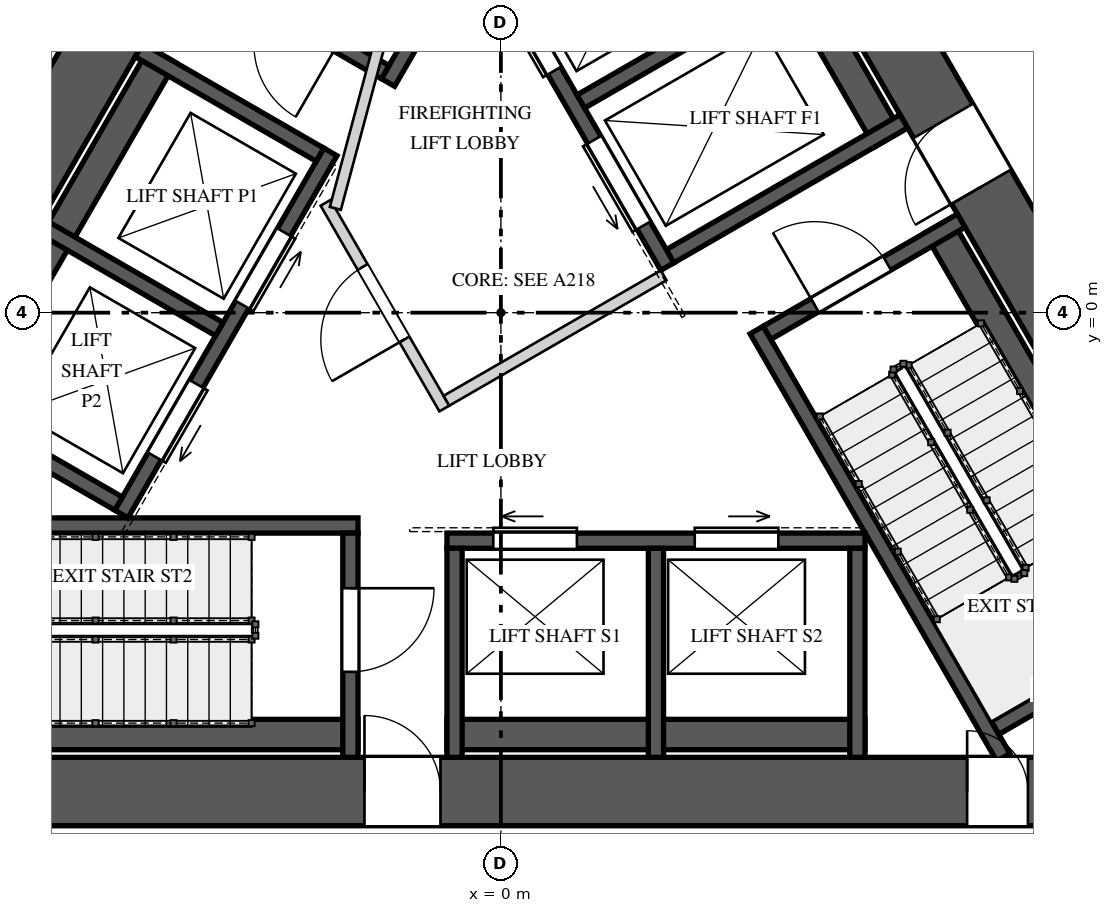
"""IFC4 building model, lengths in metres.
Left out: names, types, materials, properties, quantities, classifications, styles, units other than length and angle.
Written with IfcOpenShell. Run it as: python <this file> out.ifc"""

import sys

from ifc_helpers import new_model, si_unit, direction, frame, frame_2d, origin, place, context, subcontext, project, spatial, rectangle, extrude, element, fill, save


model = new_model("IFC4")
c1 = context("Model", 3, precision=1e-05, world=origin(), true_north=direction((0.0, 1.0)))
c2 = subcontext(c1, "Body", "Model", "MODEL_VIEW")
j1 = project(units=[si_unit("LENGTHUNIT", "METRE"), si_unit("PLANEANGLEUNIT", "RADIAN")], contexts=[c1])
p1 = place(None, origin())
s1 = spatial("IfcSite", under=j1, at=p1, CompositionType="ELEMENT")
p2 = place(p1, origin())
s2 = spatial("IfcBuilding", under=s1, at=p2, CompositionType="ELEMENT")
p3 = place(p2, frame((0.0, 0.0, 125.6)))
s3 = spatial("IfcBuildingStorey", under=s2, at=p3, CompositionType="ELEMENT", Elevation=125.6)
p4 = place(p3, frame((-1.184, 10.55, 0.0), z_axis=(0.0, 0.0, 1.0), x_axis=(-0.500004814304, -0.866022624227, 0.0)))
e1 = element("IfcWall", 1, at=p4, inside=s3, PredefinedType="SHEAR", context=c2, shape_type="SweptSolid", body=[
    extrude(rectangle(XDim=17.09, YDim=0.9, at=frame_2d((8.545, 0.0))), origin(), (0.0, 0.0, 1.0), 4.0),
])
p5 = place(p4, frame((6.75, 0.0, 0.0)))
e2 = element("IfcOpeningElement", 2, at=p5, cuts=e1, PredefinedType="OPENING", context=c2, shape_type="SweptSolid", body=[
    extrude(rectangle(XDim=1.0, YDim=2.4, at=frame_2d((0.5, 1.2))), frame((0.0, 0.46, 0.0), z_axis=(0.0, -1.0, 0.0), x_axis=(1.0, 0.0, 0.0)), (0.0, 0.0, 1.0), 0.92),
])
p6 = place(p4, frame((14.678, 0.0, 0.0)))
e3 = element("IfcOpeningElement", 3, at=p6, cuts=e1, PredefinedType="OPENING", context=c2, shape_type="SweptSolid", body=[
    extrude(rectangle(XDim=0.8, YDim=2.1, at=frame_2d((0.4, 1.05))), frame((0.0, 0.46, 0.0), z_axis=(0.0, -1.0, 0.0), x_axis=(1.0, 0.0, 0.0)), (0.0, 0.0, 1.0), 0.92),
])
p7 = place(p3, frame((-8.545, -6.3, 0.0), z_axis=(0.0, 0.0, 1.0), x_axis=(1.0, 0.0, 0.0)))
e4 = element("IfcWall", 4, at=p7, inside=s3, PredefinedType="SHEAR", context=c2, shape_type="SweptSolid", body=[
    extrude(rectangle(XDim=17.09, YDim=0.9, at=frame_2d((8.545, 0.0))), origin(), (0.0, 0.0, 1.0), 4.0),
])
p8 = place(p7, frame((6.75, 0.0, 0.0)))
e5 = element("IfcOpeningElement", 5, at=p8, cuts=e4, PredefinedType="OPENING", context=c2, shape_type="SweptSolid", body=[
    extrude(rectangle(XDim=1.0, YDim=2.4, at=frame_2d((0.5, 1.2))), frame((0.0, 0.46, 0.0), z_axis=(0.0, -1.0, 0.0), x_axis=(1.0, 0.0, 0.0)), (0.0, 0.0, 1.0), 0.92),
])
p9 = place(p7, frame((14.678, 0.0, 0.0)))
e6 = element("IfcOpeningElement", 6, at=p9, cuts=e4, PredefinedType="OPENING", context=c2, shape_type="SweptSolid", body=[
    extrude(rectangle(XDim=0.8, YDim=2.1, at=frame_2d((0.4, 1.05))), frame((0.0, 0.46, 0.0), z_axis=(0.0, -1.0, 0.0), x_axis=(1.0, 0.0, 0.0)), (0.0, 0.0, 1.0), 0.92),
])
p10 = place(p3, frame((9.729, -4.25, 0.0), z_axis=(0.0, 0.0, 1.0), x_axis=(-0.500004814304, 0.866022624227, 0.0)))
e7 = element("IfcWall", 7, at=p10, inside=s3, PredefinedType="SHEAR", context=c2, shape_type="SweptSolid", body=[
    extrude(rectangle(XDim=17.09, YDim=0.9, at=frame_2d((8.545, 0.0))), origin(), (0.0, 0.0, 1.0), 4.0),
])
p11 = place(p10, frame((6.82, 0.0, 0.0)))
e8 = element("IfcOpeningElement", 8, at=p11, cuts=e7, PredefinedType="OPENING", context=c2, shape_type="SweptSolid", body=[
    extrude(rectangle(XDim=1.0, YDim=2.4, at=frame_2d((0.5, 1.2))), frame((0.0, 0.46, 0.0), z_axis=(0.0, -1.0, 0.0), x_axis=(1.0, 0.0, 0.0)), (0.0, 0.0, 1.0), 0.92),
])
p12 = place(p3, frame((1.761, 8.65, 0.0), z_axis=(0.0, 0.0, 1.0), x_axis=(-0.500010023241, -0.866019616786, 0.0)))
e9 = element("IfcWall", 9, at=p12, inside=s3, PredefinedType="SOLIDWALL", context=c2, shape_type="SweptSolid", body=[
    extrude(rectangle(XDim=6.491, YDim=0.2, at=frame_2d((3.246, 0.0))), origin(), (0.0, 0.0, 1.0), 3.65),
])
p13 = place(p3, frame((-1.521, 3.165, 0.0), z_axis=(0.0, 0.0, 1.0), x_axis=(-0.866039495442, 0.49997559174, 0.0)))
e10 = element("IfcWall", 10, at=p13, inside=s3, PredefinedType="SOLIDWALL", context=c2, shape_type="SweptSolid", body=[
    extrude(rectangle(XDim=2.95, YDim=0.2, at=frame_2d((1.475, 0.0))), origin(), (0.0, 0.0, 1.0), 3.65),
])
p14 = place(p13, frame((0.725, 0.0, 0.0)))
e11 = element("IfcOpeningElement", 11, at=p14, cuts=e10, PredefinedType="OPENING", context=c2, shape_type="SweptSolid", body=[
    extrude(rectangle(XDim=1.1, YDim=2.4, at=frame_2d((0.55, 1.2))), frame((0.0, 0.11, 0.0), z_axis=(0.0, -1.0, 0.0), x_axis=(1.0, 0.0, 0.0)), (0.0, 0.0, 1.0), 0.22),
])
p15 = place(p3, frame((-8.08, -5.55, 0.0), z_axis=(0.0, 0.0, 1.0), x_axis=(1.0, 0.0, 0.0)))
e12 = element("IfcWall", 12, at=p15, inside=s3, PredefinedType="SOLIDWALL", context=c2, shape_type="SweptSolid", body=[
    extrude(rectangle(XDim=6.2, YDim=0.4, at=frame_2d((3.1, 0.0))), origin(), (0.0, 0.0, 1.0), 3.65),
])
p16 = place(p3, frame((-8.372, -2.8, 0.0), z_axis=(0.0, 0.0, 1.0), x_axis=(1.0, 0.0, 0.0)))
e13 = element("IfcWall", 13, at=p16, inside=s3, PredefinedType="SOLIDWALL", context=c2, shape_type="SweptSolid", body=[
    extrude(rectangle(XDim=6.492, YDim=0.2, at=frame_2d((3.246, 0.0))), origin(), (0.0, 0.0, 1.0), 3.65),
])
p17 = place(p3, frame((-1.98, -2.9, 0.0), z_axis=(0.0, 0.0, 1.0), x_axis=(0.0, -1.0, 0.0)))
e14 = element("IfcWall", 14, at=p17, inside=s3, PredefinedType="SOLIDWALL", context=c2, shape_type="SweptSolid", body=[
    extrude(rectangle(XDim=2.95, YDim=0.2, at=frame_2d((1.475, 0.0))), origin(), (0.0, 0.0, 1.0), 3.65),
])
p18 = place(p17, frame((0.725, 0.0, 0.0)))
e15 = element("IfcOpeningElement", 15, at=p18, cuts=e14, PredefinedType="OPENING", context=c2, shape_type="SweptSolid", body=[
    extrude(rectangle(XDim=1.1, YDim=2.4, at=frame_2d((0.55, 1.2))), frame((0.0, 0.11, 0.0), z_axis=(0.0, -1.0, 0.0), x_axis=(1.0, 0.0, 0.0)), (0.0, 0.0, 1.0), 0.22),
])
p19 = place(p3, frame((8.846, -4.222, 0.0), z_axis=(0.0, 0.0, 1.0), x_axis=(-0.500009909098, 0.866019682689, 0.0)))
e16 = element("IfcWall", 16, at=p19, inside=s3, PredefinedType="SOLIDWALL", context=c2, shape_type="SweptSolid", body=[
    extrude(rectangle(XDim=6.2, YDim=0.4, at=frame_2d((3.1, 0.0))), origin(), (0.0, 0.0, 1.0), 3.65),
])
p20 = place(p3, frame((6.611, -5.85, 0.0), z_axis=(0.0, 0.0, 1.0), x_axis=(-0.499965531574, 0.866045303225, 0.0)))
e17 = element("IfcWall", 17, at=p20, inside=s3, PredefinedType="SOLIDWALL", context=c2, shape_type="SweptSolid", body=[
    extrude(rectangle(XDim=6.492, YDim=0.2, at=frame_2d((3.246, 0.0))), origin(), (0.0, 0.0, 1.0), 3.65),
])
p21 = place(p3, frame((6.501, -5.461, 0.0), z_axis=(0.0, 0.0, 1.0), x_axis=(0.866003658127, 0.500037662692, 0.0)))
e18 = element("IfcWall", 18, at=p21, inside=s3, PredefinedType="SOLIDWALL", context=c2, shape_type="SweptSolid", body=[
    extrude(rectangle(XDim=2.95, YDim=0.2, at=frame_2d((1.475, 0.0))), origin(), (0.0, 0.0, 1.0), 3.65),
])
p22 = place(p3, frame((3.501, -0.265, 0.0), z_axis=(0.0, 0.0, 1.0), x_axis=(0.866039495442, 0.49997559174, 0.0)))
e19 = element("IfcWall", 19, at=p22, inside=s3, PredefinedType="SOLIDWALL", context=c2, shape_type="SweptSolid", body=[
    extrude(rectangle(XDim=2.95, YDim=0.2, at=frame_2d((1.475, 0.0))), origin(), (0.0, 0.0, 1.0), 3.65),
])
p23 = place(p22, frame((0.725, 0.0, 0.0)))
e20 = element("IfcOpeningElement", 20, at=p23, cuts=e19, PredefinedType="OPENING", context=c2, shape_type="SweptSolid", body=[
    extrude(rectangle(XDim=1.1, YDim=2.4, at=frame_2d((0.55, 1.2))), frame((0.0, 0.11, 0.0), z_axis=(0.0, -1.0, 0.0), x_axis=(1.0, 0.0, 0.0)), (0.0, 0.0, 1.0), 0.22),
])
p24 = place(p3, frame((-2.243, 2.115, 0.0), z_axis=(0.0, 0.0, 1.0), x_axis=(-0.499996545922, -0.866027397988, 0.0)))
e21 = element("IfcWall", 21, at=p24, inside=s3, PredefinedType="SOLIDWALL", context=c2, shape_type="SweptSolid", body=[
    extrude(rectangle(XDim=5.5, YDim=0.2, at=frame_2d((2.75, 0.0))), origin(), (0.0, 0.0, 1.0), 3.65),
])
p25 = place(p24, frame((1.22, 0.0, 0.0)))
e22 = element("IfcOpeningElement", 22, at=p25, cuts=e21, PredefinedType="OPENING", context=c2, shape_type="SweptSolid", body=[
    extrude(rectangle(XDim=1.1, YDim=2.1, at=frame_2d((0.55, 1.05))), frame((0.0, 0.11, 0.0), z_axis=(0.0, -1.0, 0.0), x_axis=(1.0, 0.0, 0.0)), (0.0, 0.0, 1.0), 0.22),
])
p26 = place(p24, frame((3.525, 0.0, 0.0)))
e23 = element("IfcOpeningElement", 23, at=p26, cuts=e21, PredefinedType="OPENING", context=c2, shape_type="SweptSolid", body=[
    extrude(rectangle(XDim=1.1, YDim=2.1, at=frame_2d((0.55, 1.05))), frame((0.0, 0.11, 0.0), z_axis=(0.0, -1.0, 0.0), x_axis=(1.0, 0.0, 0.0)), (0.0, 0.0, 1.0), 0.22),
])
p27 = place(p3, frame((-4.451, 3.39, 0.0), z_axis=(0.0, 0.0, 1.0), x_axis=(-0.499996545922, -0.866027397988, 0.0)))
e24 = element("IfcWall", 24, at=p27, inside=s3, PredefinedType="SOLIDWALL", context=c2, shape_type="SweptSolid", body=[
    extrude(rectangle(XDim=5.5, YDim=0.4, at=frame_2d((2.75, 0.0))), origin(), (0.0, 0.0, 1.0), 3.65),
])
for number, where, z_axis, x_axis in (
    (25, (-2.38, 2.078, 0.0), (0.0, 0.0, 1.0), (-0.866, 0.5, 0.0)),
    (26, (-3.705, -0.217, 0.0), (0.0, 0.0, 1.0), (-0.866, 0.5, 0.0)),
):
    element("IfcWall", number, at=place(p3, frame(where, z_axis=z_axis, x_axis=x_axis)), inside=s3, PredefinedType="SOLIDWALL", context=c2, shape_type="SweptSolid", body=[
        extrude(rectangle(XDim=2.75, YDim=0.2, at=frame_2d((1.375, 0.0))), origin(), (0.0, 0.0, 1.0), 3.65),
    ])
p28 = place(p3, frame((-5.03, -2.512, 0.0), z_axis=(0.0, 0.0, 1.0), x_axis=(-0.866005201286, 0.500034990121, 0.0)))
e27 = element("IfcWall", 27, at=p28, inside=s3, PredefinedType="SOLIDWALL", context=c2, shape_type="SweptSolid", body=[
    extrude(rectangle(XDim=2.75, YDim=0.2, at=frame_2d((1.375, 0.0))), origin(), (0.0, 0.0, 1.0), 3.65),
])
p29 = place(p3, frame((-0.71, -3.0, 0.0), z_axis=(0.0, 0.0, 1.0), x_axis=(1.0, 0.0, 0.0)))
e28 = element("IfcWall", 28, at=p29, inside=s3, PredefinedType="SOLIDWALL", context=c2, shape_type="SweptSolid", body=[
    extrude(rectangle(XDim=5.5, YDim=0.2, at=frame_2d((2.75, 0.0))), origin(), (0.0, 0.0, 1.0), 3.65),
])
p30 = place(p29, frame((0.61, 0.0, 0.0)))
e29 = element("IfcOpeningElement", 29, at=p30, cuts=e28, PredefinedType="OPENING", context=c2, shape_type="SweptSolid", body=[
    extrude(rectangle(XDim=1.1, YDim=2.1, at=frame_2d((0.55, 1.05))), frame((0.0, 0.11, 0.0), z_axis=(0.0, -1.0, 0.0), x_axis=(1.0, 0.0, 0.0)), (0.0, 0.0, 1.0), 0.22),
])
p31 = place(p29, frame((3.26, 0.0, 0.0)))
e30 = element("IfcOpeningElement", 30, at=p31, cuts=e28, PredefinedType="OPENING", context=c2, shape_type="SweptSolid", body=[
    extrude(rectangle(XDim=1.1, YDim=2.1, at=frame_2d((0.55, 1.05))), frame((0.0, 0.11, 0.0), z_axis=(0.0, -1.0, 0.0), x_axis=(1.0, 0.0, 0.0)), (0.0, 0.0, 1.0), 0.22),
])
p32 = place(p3, frame((-0.71, -5.55, 0.0), z_axis=(0.0, 0.0, 1.0), x_axis=(1.0, 0.0, 0.0)))
e31 = element("IfcWall", 31, at=p32, inside=s3, PredefinedType="SOLIDWALL", context=c2, shape_type="SweptSolid", body=[
    extrude(rectangle(XDim=5.5, YDim=0.4, at=frame_2d((2.75, 0.0))), origin(), (0.0, 0.0, 1.0), 3.65),
])
for number, where, z_axis, x_axis in (
    (32, (-0.61, -3.1, 0.0), (0.0, 0.0, 1.0), (0.0, -1.0, 0.0)),
    (33, (2.04, -3.1, 0.0), (0.0, 0.0, 1.0), (0.0, -1.0, 0.0)),
    (34, (4.69, -3.1, 0.0), (0.0, 0.0, 1.0), (0.0, -1.0, 0.0)),
):
    element("IfcWall", number, at=place(p3, frame(where, z_axis=z_axis, x_axis=x_axis)), inside=s3, PredefinedType="SOLIDWALL", context=c2, shape_type="SweptSolid", body=[
        extrude(rectangle(XDim=2.75, YDim=0.2, at=frame_2d((1.375, 0.0))), origin(), (0.0, 0.0, 1.0), 3.65),
    ])
p33 = place(p3, frame((2.19, 0.606, 0.0), z_axis=(0.0, 0.0, 1.0), x_axis=(-0.500002801628, 0.866023786258, 0.0)))
e35 = element("IfcWall", 35, at=p33, inside=s3, PredefinedType="SOLIDWALL", context=c2, shape_type="SweptSolid", body=[
    extrude(rectangle(XDim=4.9, YDim=0.2, at=frame_2d((2.45, 0.0))), origin(), (0.0, 0.0, 1.0), 3.65),
])
p34 = place(p33, frame((0.625, 0.0, 0.0)))
e36 = element("IfcOpeningElement", 36, at=p34, cuts=e35, PredefinedType="OPENING", context=c2, shape_type="SweptSolid", body=[
    extrude(rectangle(XDim=1.3, YDim=2.1, at=frame_2d((0.65, 1.05))), frame((0.0, 0.11, 0.0), z_axis=(0.0, -1.0, 0.0), x_axis=(1.0, 0.0, 0.0)), (0.0, 0.0, 1.0), 0.22),
])
p35 = place(p33, frame((2.975, 0.0, 0.0)))
e37 = element("IfcOpeningElement", 37, at=p35, cuts=e35, PredefinedType="OPENING", context=c2, shape_type="SweptSolid", body=[
    extrude(rectangle(XDim=1.3, YDim=2.1, at=frame_2d((0.65, 1.05))), frame((0.0, 0.11, 0.0), z_axis=(0.0, -1.0, 0.0), x_axis=(1.0, 0.0, 0.0)), (0.0, 0.0, 1.0), 0.22),
])
p36 = place(p3, frame((5.092, 2.281, 0.0), z_axis=(0.0, 0.0, 1.0), x_axis=(-0.500018594424, 0.866014668023, 0.0)))
e38 = element("IfcWall", 38, at=p36, inside=s3, PredefinedType="SOLIDWALL", context=c2, shape_type="SweptSolid", body=[
    extrude(rectangle(XDim=4.9, YDim=0.4, at=frame_2d((2.45, 0.0))), origin(), (0.0, 0.0, 1.0), 3.65),
])
for number, where, z_axis, x_axis in (
    (39, (2.227, 0.743, 0.0), (0.0, 0.0, 1.0), (0.866, 0.5, 0.0)),
    (40, (1.052, 2.778, 0.0), (0.0, 0.0, 1.0), (0.866, 0.5, 0.0)),
):
    element("IfcWall", number, at=place(p3, frame(where, z_axis=z_axis, x_axis=x_axis)), inside=s3, PredefinedType="SOLIDWALL", context=c2, shape_type="SweptSolid", body=[
        extrude(rectangle(XDim=3.55, YDim=0.2, at=frame_2d((1.775, 0.0))), origin(), (0.0, 0.0, 1.0), 3.65),
    ])
p37 = place(p3, frame((-0.744, -1.261, 0.0), z_axis=(0.0, 0.0, 1.0), x_axis=(-0.500004234368, 0.866022959057, 0.0)))
e41 = element("IfcWall", 41, at=p37, inside=s3, PredefinedType="PARTITIONING", context=c2, shape_type="SweptSolid", body=[
    extrude(rectangle(XDim=3.125, YDim=0.15, at=frame_2d((1.562, 0.0))), origin(), (0.0, 0.0, 1.0), 3.65),
])
p38 = place(p37, frame((1.05, 0.0, 0.0)))
e42 = element("IfcOpeningElement", 42, at=p38, cuts=e41, PredefinedType="OPENING", context=c2, shape_type="SweptSolid", body=[
    extrude(rectangle(XDim=1.1, YDim=2.4, at=frame_2d((0.55, 1.2))), frame((0.0, 0.085, 0.0), z_axis=(0.0, -1.0, 0.0), x_axis=(1.0, 0.0, 0.0)), (0.0, 0.0, 1.0), 0.17),
])
p39 = place(p3, frame((-0.717, -1.159, 0.0), z_axis=(0.0, 0.0, 1.0), x_axis=(0.866008176907, 0.50002983664, 0.0)))
e43 = element("IfcWall", 43, at=p39, inside=s3, PredefinedType="PARTITIONING", context=c2, shape_type="SweptSolid", body=[
    extrude(rectangle(XDim=3.3, YDim=0.15, at=frame_2d((1.65, 0.0))), origin(), (0.0, 0.0, 1.0), 3.65),
])
p40 = place(p3, frame((-2.178, 1.372, 0.0), z_axis=(0.0, 0.0, 1.0), x_axis=(0.258808958833, 0.96592852884, 0.0)))
e44 = element("IfcWall", 44, at=p40, inside=s3, PredefinedType="PARTITIONING", context=c2, shape_type="SweptSolid", body=[
    extrude(rectangle(XDim=2.903, YDim=0.15, at=frame_2d((1.451, 0.0))), origin(), (0.0, 0.0, 1.0), 3.65),
])
p41 = place(p18, origin())
e45 = element("IfcDoor", 45, at=p41, inside=s3, OperationType="SINGLE_SWING_LEFT", PredefinedType="DOOR", context=c2, shape_type="SweptSolid", body=[
    extrude(rectangle(XDim=1.1, YDim=2.4, at=frame_2d((0.55, 1.2))), frame((0.0, 0.025, 0.0), z_axis=(0.0, -1.0, 0.0), x_axis=(1.0, 0.0, 0.0)), (0.0, 0.0, 1.0), 0.05),
])
fill(e15, e45)
p42 = place(p23, origin())
e46 = element("IfcDoor", 46, at=p42, inside=s3, OperationType="SINGLE_SWING_RIGHT", PredefinedType="DOOR", context=c2, shape_type="SweptSolid", body=[
    extrude(rectangle(XDim=1.1, YDim=2.4, at=frame_2d((0.55, 1.2))), frame((0.0, 0.025, 0.0), z_axis=(0.0, -1.0, 0.0), x_axis=(1.0, 0.0, 0.0)), (0.0, 0.0, 1.0), 0.05),
])
fill(e20, e46)
p43 = place(p25, origin())
e47 = element("IfcDoor", 47, at=p43, inside=s3, OperationType="SLIDING_TO_LEFT", PredefinedType="DOOR", context=c2, shape_type="SweptSolid", body=[
    extrude(rectangle(XDim=1.1, YDim=2.1, at=frame_2d((0.55, 1.05))), frame((0.0, 0.025, 0.0), z_axis=(0.0, -1.0, 0.0), x_axis=(1.0, 0.0, 0.0)), (0.0, 0.0, 1.0), 0.05),
])
fill(e22, e47)
p44 = place(p26, origin())
e48 = element("IfcDoor", 48, at=p44, inside=s3, OperationType="SLIDING_TO_RIGHT", PredefinedType="DOOR", context=c2, shape_type="SweptSolid", body=[
    extrude(rectangle(XDim=1.1, YDim=2.1, at=frame_2d((0.55, 1.05))), frame((0.0, 0.025, 0.0), z_axis=(0.0, -1.0, 0.0), x_axis=(1.0, 0.0, 0.0)), (0.0, 0.0, 1.0), 0.05),
])
fill(e23, e48)
p45 = place(p30, origin())
e49 = element("IfcDoor", 49, at=p45, inside=s3, OperationType="SLIDING_TO_LEFT", PredefinedType="DOOR", context=c2, shape_type="SweptSolid", body=[
    extrude(rectangle(XDim=1.1, YDim=2.1, at=frame_2d((0.55, 1.05))), frame((0.0, 0.025, 0.0), z_axis=(0.0, -1.0, 0.0), x_axis=(1.0, 0.0, 0.0)), (0.0, 0.0, 1.0), 0.05),
])
fill(e29, e49)
p46 = place(p31, origin())
e50 = element("IfcDoor", 50, at=p46, inside=s3, OperationType="SLIDING_TO_RIGHT", PredefinedType="DOOR", context=c2, shape_type="SweptSolid", body=[
    extrude(rectangle(XDim=1.1, YDim=2.1, at=frame_2d((0.55, 1.05))), frame((0.0, 0.025, 0.0), z_axis=(0.0, -1.0, 0.0), x_axis=(1.0, 0.0, 0.0)), (0.0, 0.0, 1.0), 0.05),
])
fill(e30, e50)
p47 = place(p34, origin())
e51 = element("IfcDoor", 51, at=p47, inside=s3, OperationType="SLIDING_TO_LEFT", PredefinedType="DOOR", context=c2, shape_type="SweptSolid", body=[
    extrude(rectangle(XDim=1.3, YDim=2.1, at=frame_2d((0.65, 1.05))), frame((0.0, 0.025, 0.0), z_axis=(0.0, -1.0, 0.0), x_axis=(1.0, 0.0, 0.0)), (0.0, 0.0, 1.0), 0.05),
])
fill(e36, e51)
p48 = place(p35, origin())
e52 = element("IfcDoor", 52, at=p48, inside=s3, OperationType="SLIDING_TO_RIGHT", PredefinedType="DOOR", context=c2, shape_type="SweptSolid", body=[
    extrude(rectangle(XDim=1.3, YDim=2.1, at=frame_2d((0.65, 1.05))), frame((0.0, 0.025, 0.0), z_axis=(0.0, -1.0, 0.0), x_axis=(1.0, 0.0, 0.0)), (0.0, 0.0, 1.0), 0.05),
])
fill(e37, e52)
p49 = place(p38, origin())
e53 = element("IfcDoor", 53, at=p49, inside=s3, OperationType="SINGLE_SWING_LEFT", PredefinedType="DOOR", context=c2, shape_type="SweptSolid", body=[
    extrude(rectangle(XDim=1.1, YDim=2.4, at=frame_2d((0.55, 1.2))), frame((0.0, 0.025, 0.0), z_axis=(0.0, -1.0, 0.0), x_axis=(1.0, 0.0, 0.0)), (0.0, 0.0, 1.0), 0.05),
])
fill(e42, e53)
p50 = place(p8, origin())
e54 = element("IfcDoor", 54, at=p50, inside=s3, OperationType="SINGLE_SWING_LEFT", PredefinedType="DOOR", context=c2, shape_type="SweptSolid", body=[
    extrude(rectangle(XDim=1.0, YDim=2.4, at=frame_2d((0.5, 1.2))), frame((0.0, 0.025, 0.0), z_axis=(0.0, -1.0, 0.0), x_axis=(1.0, 0.0, 0.0)), (0.0, 0.0, 1.0), 0.05),
])
fill(e5, e54)
p51 = place(p11, origin())
e55 = element("IfcDoor", 55, at=p51, inside=s3, OperationType="SINGLE_SWING_RIGHT", PredefinedType="DOOR", context=c2, shape_type="SweptSolid", body=[
    extrude(rectangle(XDim=1.0, YDim=2.4, at=frame_2d((0.5, 1.2))), frame((0.0, 0.025, 0.0), z_axis=(0.0, -1.0, 0.0), x_axis=(1.0, 0.0, 0.0)), (0.0, 0.0, 1.0), 0.05),
])
fill(e8, e55)
p52 = place(p9, origin())
e56 = element("IfcDoor", 56, at=p52, inside=s3, OperationType="SINGLE_SWING_RIGHT", PredefinedType="DOOR", context=c2, shape_type="SweptSolid", body=[
    extrude(rectangle(XDim=0.8, YDim=2.1, at=frame_2d((0.4, 1.05))), frame((0.0, 0.025, 0.0), z_axis=(0.0, -1.0, 0.0), x_axis=(1.0, 0.0, 0.0)), (0.0, 0.0, 1.0), 0.05),
])
fill(e6, e56)
save(model, sys.argv[1])
